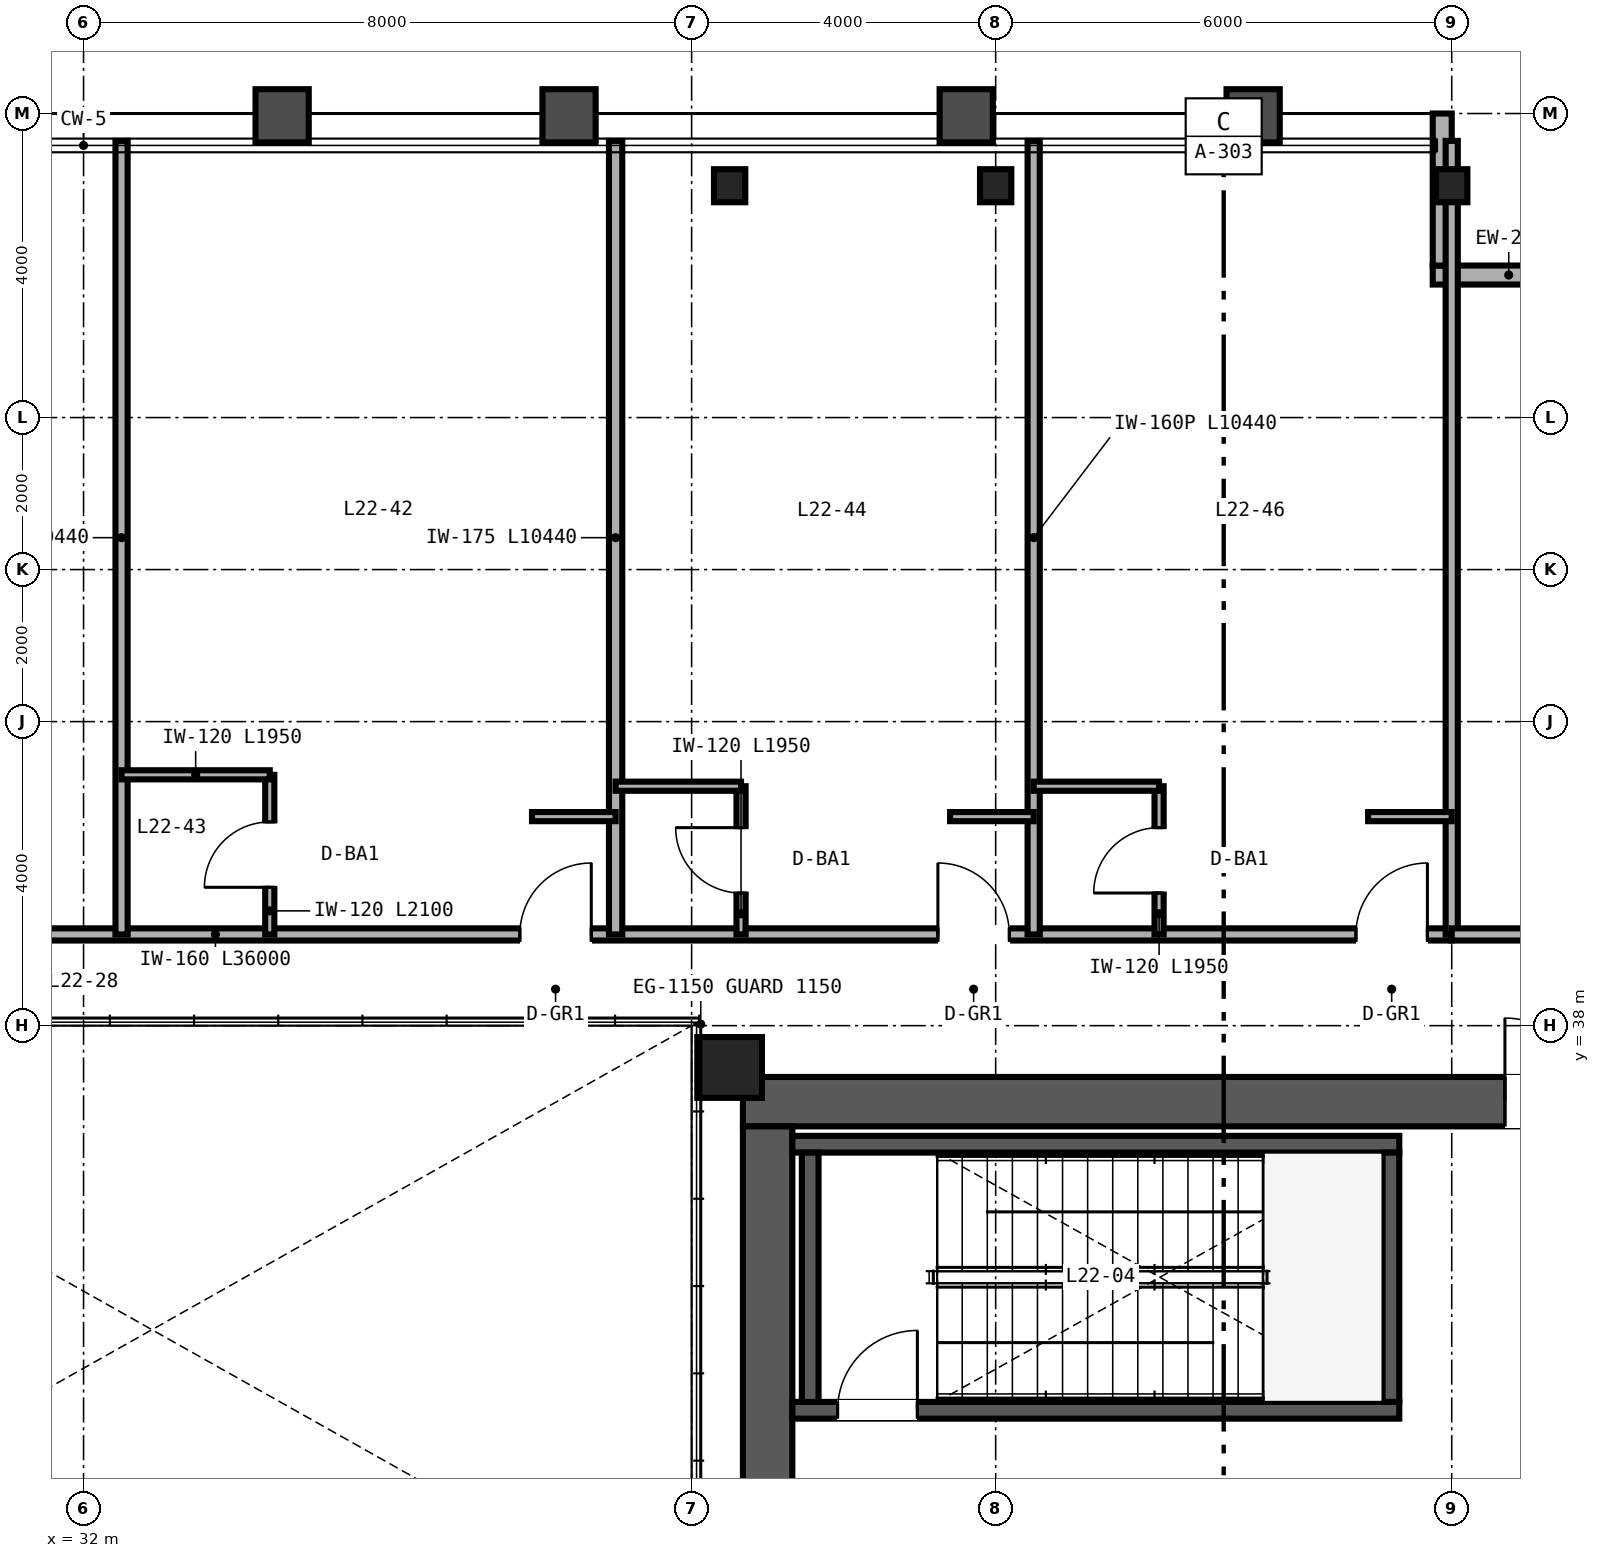
"""IFC4 building model, lengths in metres.
Left out: names, types, materials, properties, quantities, classifications, styles, units other than length and angle.
Written with IfcOpenShell. Run it as: python <this file> out.ifc"""

import sys

from ifc_helpers import new_model, si_unit, direction, frame, frame_2d, origin, origin_2d, place, context, subcontext, project, spatial, rectangle, hollow_rectangle, i_section, extrude, source, transform, mapped, element, fill, save


model = new_model("IFC4")
c1 = context("Model", 3, precision=1e-05, world=origin(), true_north=direction((0.0, 1.0)))
c2 = subcontext(c1, "Body", "Model", "MODEL_VIEW")
j1 = project(units=[si_unit("LENGTHUNIT", "METRE"), si_unit("PLANEANGLEUNIT", "RADIAN")], contexts=[c1])
p1 = place(None, origin())
s1 = spatial("IfcSite", under=j1, at=p1, CompositionType="ELEMENT")
p2 = place(p1, origin())
s2 = spatial("IfcBuilding", under=s1, at=p2, CompositionType="ELEMENT")
p3 = place(p2, frame((0.0, 0.0, 92.4)))
s3 = spatial("IfcBuildingStorey", under=s2, at=p3, CompositionType="ELEMENT", Elevation=92.4)
p4 = place(p3, frame((40.675, 37.0, 0.0), z_axis=(0.0, 0.0, 1.0), x_axis=(1.0, 0.0, 0.0)))
e1 = element("IfcWall", 1, at=p4, inside=s3, PredefinedType="SHEAR", context=c2, shape_type="SweptSolid", body=[
    extrude(rectangle(XDim=12.65, YDim=0.65, at=frame_2d((6.325, 0.0))), origin(), (0.0, 0.0, 1.0), 4.56),
])
p5 = place(p4, frame((10.025, 0.0, 0.0)))
e2 = element("IfcOpeningElement", 2, at=p5, cuts=e1, PredefinedType="OPENING", context=c2, shape_type="SweptSolid", body=[
    extrude(rectangle(XDim=1.1, YDim=2.15, at=frame_2d((0.55, 1.075))), frame((0.0, 0.335, 0.0), z_axis=(0.0, -1.0, 0.0), x_axis=(1.0, 0.0, 0.0)), (0.0, 0.0, 1.0), 0.67),
])
p6 = place(p3, frame((41.0, 15.325, 0.0), z_axis=(0.0, 0.0, 1.0), x_axis=(0.0, 1.0, 0.0)))
e3 = element("IfcWall", 3, at=p6, inside=s3, PredefinedType="SHEAR", context=c2, shape_type="SweptSolid", body=[
    extrude(rectangle(XDim=21.35, YDim=0.65, at=frame_2d((10.675, 0.0))), origin(), (0.0, 0.0, 1.0), 4.56),
])
p7 = place(p3, frame((41.325, 32.94, 0.0), z_axis=(0.0, 0.0, 1.0), x_axis=(1.0, 0.0, 0.0)))
e4 = element("IfcWall", 4, at=p7, inside=s3, PredefinedType="SHEAR", context=c2, shape_type="SweptSolid", body=[
    extrude(rectangle(XDim=7.985, YDim=0.22, at=frame_2d((3.993, 0.0))), origin(), (0.0, 0.0, 1.0), 4.6),
])
p8 = place(p7, frame((0.595, 0.0, 0.0)))
e5 = element("IfcOpeningElement", 5, at=p8, cuts=e4, PredefinedType="OPENING", context=c2, shape_type="SweptSolid", body=[
    extrude(rectangle(XDim=1.05, YDim=2.15, at=frame_2d((0.525, 1.075))), frame((0.0, 0.12, 0.0), z_axis=(0.0, -1.0, 0.0), x_axis=(1.0, 0.0, 0.0)), (0.0, 0.0, 1.0), 0.24),
])
p9 = place(p3, frame((41.325, 36.44, 0.0), z_axis=(0.0, 0.0, 1.0), x_axis=(1.0, 0.0, 0.0)))
e6 = element("IfcWall", 6, at=p9, inside=s3, PredefinedType="SHEAR", context=c2, shape_type="SweptSolid", body=[
    extrude(rectangle(XDim=7.985, YDim=0.22, at=frame_2d((3.993, 0.0))), origin(), (0.0, 0.0, 1.0), 4.6),
])
for number, where, z_axis, x_axis in (
    (7, (41.56, 33.05, 0.0), (0.0, 0.0, 1.0), (0.0, 1.0, 0.0)),
    (8, (49.2, 33.05, 0.0), (0.0, 0.0, 1.0), (0.0, 1.0, 0.0)),
):
    element("IfcWall", number, at=place(p3, frame(where, z_axis=z_axis, x_axis=x_axis)), inside=s3, PredefinedType="SHEAR", context=c2, shape_type="SweptSolid", body=[
        extrude(rectangle(XDim=3.28, YDim=0.22, at=frame_2d((1.64, 0.0))), origin(), (0.0, 0.0, 1.0), 4.6),
    ])
m1 = source(origin(), c2, "Body", "SweptSolid", [
    extrude(hollow_rectangle(XDim=0.85, YDim=0.8, WallThickness=0.032, at=origin_2d()), origin(), (0.0, 0.0, 1.0), 4.56),
])
p10 = place(p3, frame((40.5, 37.45, 0.0), z_axis=(0.0, 0.0, 1.0), x_axis=(1.0, 0.0, 0.0)))
e9 = element("IfcColumn", 9, at=p10, inside=s3, PredefinedType="COLUMN", context=c2, shape_type="MappedRepresentation", body=[
    mapped(m1, transform((0.0, 0.0, 0.0), scale=1.0)),
])
m2 = source(origin(), c2, "Body", "SweptSolid", [
    extrude(i_section(OverallWidth=0.412, OverallDepth=0.435, WebThickness=0.036, FlangeThickness=0.057, FilletRadius=0.025, at=origin_2d()), origin(), (0.0, 0.0, 1.0), 4.56),
])
for number, where, z_axis, x_axis in (
    (10, (40.5, 49.05, 0.0), (0.0, 0.0, 1.0), (1.0, 0.0, 0.0)),
    (11, (44.0, 49.05, 0.0), (0.0, 0.0, 1.0), (1.0, 0.0, 0.0)),
    (12, (50.0, 49.05, 0.0), (0.0, 0.0, 1.0), (1.0, 0.0, 0.0)),
):
    element("IfcColumn", number, at=place(p3, frame(where, z_axis=z_axis, x_axis=x_axis)), inside=s3, PredefinedType="COLUMN", context=c2, shape_type="MappedRepresentation", body=[
        mapped(m2, transform((0.0, 0.0, 0.0), scale=1.0)),
    ])
p11 = place(p3, frame((51.75, 47.875, 0.0), z_axis=(0.0, 0.0, 1.0), x_axis=(-1.0, 0.0, 0.0)))
e13 = element("IfcWall", 13, at=p11, inside=s3, PredefinedType="SOLIDWALL", context=c2, shape_type="SweptSolid", body=[
    extrude(rectangle(XDim=2.0, YDim=0.25, at=frame_2d((1.0, 0.0))), origin(), (0.0, 0.0, 1.0), 4.56),
])
p12 = place(p3, frame((49.875, 48.0, 0.0), z_axis=(0.0, 0.0, 1.0), x_axis=(0.0, 1.0, 0.0)))
e14 = element("IfcWall", 14, at=p12, inside=s3, PredefinedType="SOLIDWALL", context=c2, shape_type="SweptSolid", body=[
    extrude(rectangle(XDim=2.0, YDim=0.25, at=frame_2d((1.0, 0.0))), origin(), (0.0, 0.0, 1.0), 3.867),
])
p13 = place(p3, frame((14.0, 39.2, 0.0), z_axis=(0.0, 0.0, 1.0), x_axis=(1.0, 0.0, 0.0)))
e15 = element("IfcWall", 15, at=p13, inside=s3, PredefinedType="PARTITIONING", context=c2, shape_type="SweptSolid", body=[
    extrude(rectangle(XDim=36.0, YDim=0.16, at=frame_2d((18.0, 0.0))), origin(), (0.0, 0.0, 1.0), 3.781),
])
p14 = place(p13, frame((4.74, 0.0, 0.0)))
e16 = element("IfcOpeningElement", 16, at=p14, cuts=e15, PredefinedType="OPENING", context=c2, shape_type="SweptSolid", body=[
    extrude(rectangle(XDim=0.94, YDim=2.15, at=frame_2d((0.47, 1.075))), frame((0.0, 0.09, 0.0), z_axis=(0.0, -1.0, 0.0), x_axis=(1.0, 0.0, 0.0)), (0.0, 0.0, 1.0), 0.18),
])
p15 = place(p13, frame((10.74, 0.0, 0.0)))
e17 = element("IfcOpeningElement", 17, at=p15, cuts=e15, PredefinedType="OPENING", context=c2, shape_type="SweptSolid", body=[
    extrude(rectangle(XDim=0.94, YDim=2.15, at=frame_2d((0.47, 1.075))), frame((0.0, 0.09, 0.0), z_axis=(0.0, -1.0, 0.0), x_axis=(1.0, 0.0, 0.0)), (0.0, 0.0, 1.0), 0.18),
])
p16 = place(p13, frame((14.77, 0.0, 0.0)))
e18 = element("IfcOpeningElement", 18, at=p16, cuts=e15, PredefinedType="OPENING", context=c2, shape_type="SweptSolid", body=[
    extrude(rectangle(XDim=0.96, YDim=2.15, at=frame_2d((0.48, 1.075))), frame((0.0, 0.09, 0.0), z_axis=(0.0, -1.0, 0.0), x_axis=(1.0, 0.0, 0.0)), (0.0, 0.0, 1.0), 0.18),
])
p17 = place(p13, frame((23.74, 0.0, 0.0)))
e19 = element("IfcOpeningElement", 19, at=p17, cuts=e15, PredefinedType="OPENING", context=c2, shape_type="SweptSolid", body=[
    extrude(rectangle(XDim=0.94, YDim=2.15, at=frame_2d((0.47, 1.075))), frame((0.0, 0.09, 0.0), z_axis=(0.0, -1.0, 0.0), x_axis=(1.0, 0.0, 0.0)), (0.0, 0.0, 1.0), 0.18),
])
p18 = place(p13, frame((29.24, 0.0, 0.0)))
e20 = element("IfcOpeningElement", 20, at=p18, cuts=e15, PredefinedType="OPENING", context=c2, shape_type="SweptSolid", body=[
    extrude(rectangle(XDim=0.94, YDim=2.15, at=frame_2d((0.47, 1.075))), frame((0.0, 0.09, 0.0), z_axis=(0.0, -1.0, 0.0), x_axis=(1.0, 0.0, 0.0)), (0.0, 0.0, 1.0), 0.18),
])
p19 = place(p13, frame((34.74, 0.0, 0.0)))
e21 = element("IfcOpeningElement", 21, at=p19, cuts=e15, PredefinedType="OPENING", context=c2, shape_type="SweptSolid", body=[
    extrude(rectangle(XDim=0.94, YDim=2.15, at=frame_2d((0.47, 1.075))), frame((0.0, 0.09, 0.0), z_axis=(0.0, -1.0, 0.0), x_axis=(1.0, 0.0, 0.0)), (0.0, 0.0, 1.0), 0.18),
])
p20 = place(p3, frame((50.0, 39.2, 0.0), z_axis=(0.0, 0.0, 1.0), x_axis=(0.0, 1.0, 0.0)))
e22 = element("IfcWall", 22, at=p20, inside=s3, PredefinedType="PARTITIONING", context=c2, shape_type="SweptSolid", body=[
    extrude(rectangle(XDim=10.44, YDim=0.16, at=frame_2d((5.22, 0.0))), origin(), (0.0, 0.0, 1.0), 3.867),
])
p21 = place(p3, frame((32.5, 39.2, 0.0), z_axis=(0.0, 0.0, 1.0), x_axis=(0.0, 1.0, 0.0)))
e23 = element("IfcWall", 23, at=p21, inside=s3, PredefinedType="PARTITIONING", context=c2, shape_type="SweptSolid", body=[
    extrude(rectangle(XDim=10.44, YDim=0.16, at=frame_2d((5.22, 0.0))), origin(), (0.0, 0.0, 1.0), 3.633),
])
p22 = place(p3, frame((39.0, 39.2, 0.0), z_axis=(0.0, 0.0, 1.0), x_axis=(0.0, 1.0, 0.0)))
e24 = element("IfcWall", 24, at=p22, inside=s3, PredefinedType="PARTITIONING", context=c2, shape_type="SweptSolid", body=[
    extrude(rectangle(XDim=10.44, YDim=0.175, at=frame_2d((5.22, 0.0))), origin(), (0.0, 0.0, 1.0), 3.633),
])
p23 = place(p3, frame((34.45, 39.2, 0.0), z_axis=(0.0, 0.0, 1.0), x_axis=(0.0, 1.0, 0.0)))
e25 = element("IfcWall", 25, at=p23, inside=s3, PredefinedType="PARTITIONING", context=c2, shape_type="SweptSolid", body=[
    extrude(rectangle(XDim=2.1, YDim=0.12, at=frame_2d((1.05, 0.0))), origin(), (0.0, 0.0, 1.0), 4.56),
])
p24 = place(p23, frame((0.62, 0.0, 0.0)))
e26 = element("IfcOpeningElement", 26, at=p24, cuts=e25, PredefinedType="OPENING", context=c2, shape_type="SweptSolid", body=[
    extrude(rectangle(XDim=0.86, YDim=2.1, at=frame_2d((0.43, 1.05))), frame((0.0, 0.07, 0.0), z_axis=(0.0, -1.0, 0.0), x_axis=(1.0, 0.0, 0.0)), (0.0, 0.0, 1.0), 0.14),
])
p25 = place(p3, frame((32.5, 41.3, 0.0), z_axis=(0.0, 0.0, 1.0), x_axis=(1.0, 0.0, 0.0)))
e27 = element("IfcWall", 27, at=p25, inside=s3, PredefinedType="PARTITIONING", context=c2, shape_type="SweptSolid", body=[
    extrude(rectangle(XDim=1.95, YDim=0.12, at=frame_2d((0.975, 0.0))), origin(), (0.0, 0.0, 1.0), 4.56),
])
p26 = place(p3, frame((37.9, 40.75, 0.0), z_axis=(0.0, 0.0, 1.0), x_axis=(1.0, 0.0, 0.0)))
e28 = element("IfcWall", 28, at=p26, inside=s3, PredefinedType="PARTITIONING", context=c2, shape_type="SweptSolid", body=[
    extrude(rectangle(XDim=1.1, YDim=0.12, at=frame_2d((0.55, 0.0))), origin(), (0.0, 0.0, 1.0), 4.56),
])
p27 = place(p3, frame((44.5, 39.2, 0.0), z_axis=(0.0, 0.0, 1.0), x_axis=(0.0, 1.0, 0.0)))
e29 = element("IfcWall", 29, at=p27, inside=s3, PredefinedType="PARTITIONING", context=c2, shape_type="SweptSolid", body=[
    extrude(rectangle(XDim=10.44, YDim=0.16, at=frame_2d((5.22, 0.0))), origin(), (0.0, 0.0, 1.0), 3.867),
])
p28 = place(p3, frame((40.65, 39.2, 0.0), z_axis=(0.0, 0.0, 1.0), x_axis=(0.0, 1.0, 0.0)))
e30 = element("IfcWall", 30, at=p28, inside=s3, PredefinedType="PARTITIONING", context=c2, shape_type="SweptSolid", body=[
    extrude(rectangle(XDim=1.95, YDim=0.12, at=frame_2d((0.975, 0.0))), origin(), (0.0, 0.0, 1.0), 3.781),
])
p29 = place(p28, frame((0.545, 0.0, 0.0)))
e31 = element("IfcOpeningElement", 31, at=p29, cuts=e30, PredefinedType="OPENING", context=c2, shape_type="SweptSolid", body=[
    extrude(rectangle(XDim=0.86, YDim=2.1, at=frame_2d((0.43, 1.05))), frame((0.0, 0.07, 0.0), z_axis=(0.0, -1.0, 0.0), x_axis=(1.0, 0.0, 0.0)), (0.0, 0.0, 1.0), 0.14),
])
p30 = place(p3, frame((39.0, 41.15, 0.0), z_axis=(0.0, 0.0, 1.0), x_axis=(1.0, 0.0, 0.0)))
e32 = element("IfcWall", 32, at=p30, inside=s3, PredefinedType="PARTITIONING", context=c2, shape_type="SweptSolid", body=[
    extrude(rectangle(XDim=1.65, YDim=0.12, at=frame_2d((0.825, 0.0))), origin(), (0.0, 0.0, 1.0), 3.781),
])
p31 = place(p3, frame((43.4, 40.75, 0.0), z_axis=(0.0, 0.0, 1.0), x_axis=(1.0, 0.0, 0.0)))
e33 = element("IfcWall", 33, at=p31, inside=s3, PredefinedType="PARTITIONING", context=c2, shape_type="SweptSolid", body=[
    extrude(rectangle(XDim=1.1, YDim=0.12, at=frame_2d((0.55, 0.0))), origin(), (0.0, 0.0, 1.0), 4.56),
])
p32 = place(p3, frame((46.15, 39.2, 0.0), z_axis=(0.0, 0.0, 1.0), x_axis=(0.0, 1.0, 0.0)))
e34 = element("IfcWall", 34, at=p32, inside=s3, PredefinedType="PARTITIONING", context=c2, shape_type="SweptSolid", body=[
    extrude(rectangle(XDim=1.95, YDim=0.12, at=frame_2d((0.975, 0.0))), origin(), (0.0, 0.0, 1.0), 4.56),
])
p33 = place(p32, frame((0.545, 0.0, 0.0)))
e35 = element("IfcOpeningElement", 35, at=p33, cuts=e34, PredefinedType="OPENING", context=c2, shape_type="SweptSolid", body=[
    extrude(rectangle(XDim=0.86, YDim=2.1, at=frame_2d((0.43, 1.05))), frame((0.0, 0.07, 0.0), z_axis=(0.0, -1.0, 0.0), x_axis=(1.0, 0.0, 0.0)), (0.0, 0.0, 1.0), 0.14),
])
p34 = place(p3, frame((44.5, 41.15, 0.0), z_axis=(0.0, 0.0, 1.0), x_axis=(1.0, 0.0, 0.0)))
e36 = element("IfcWall", 36, at=p34, inside=s3, PredefinedType="PARTITIONING", context=c2, shape_type="SweptSolid", body=[
    extrude(rectangle(XDim=1.65, YDim=0.12, at=frame_2d((0.825, 0.0))), origin(), (0.0, 0.0, 1.0), 4.56),
])
p35 = place(p3, frame((48.9, 40.75, 0.0), z_axis=(0.0, 0.0, 1.0), x_axis=(1.0, 0.0, 0.0)))
e37 = element("IfcWall", 37, at=p35, inside=s3, PredefinedType="PARTITIONING", context=c2, shape_type="SweptSolid", body=[
    extrude(rectangle(XDim=1.1, YDim=0.12, at=frame_2d((0.55, 0.0))), origin(), (0.0, 0.0, 1.0), 4.56),
])
p36 = place(p3, frame((50.0, 39.2, 0.0), z_axis=(0.0, 0.0, 1.0), x_axis=(1.0, 0.0, 0.0)))
e38 = element("IfcWall", 38, at=p36, inside=s3, PredefinedType="PARTITIONING", context=c2, shape_type="SweptSolid", body=[
    extrude(rectangle(XDim=5.62, YDim=0.16, at=frame_2d((2.81, 0.0))), origin(), (0.0, 0.0, 1.0), 4.56),
])
p37 = place(p36, frame((1.8, 0.0, 0.0)))
e39 = element("IfcOpeningElement", 39, at=p37, cuts=e38, PredefinedType="OPENING", context=c2, shape_type="SweptSolid", body=[
    extrude(rectangle(XDim=0.96, YDim=2.15, at=frame_2d((0.48, 1.075))), frame((0.0, 0.09, 0.0), z_axis=(0.0, -1.0, 0.0), x_axis=(1.0, 0.0, 0.0)), (0.0, 0.0, 1.0), 0.18),
])
m3 = source(origin(), c2, "Body", "SweptSolid", [
    extrude(rectangle(XDim=1.05, YDim=2.15, at=frame_2d((0.525, 1.075))), frame((0.0, 0.025, 0.0), z_axis=(0.0, -1.0, 0.0), x_axis=(1.0, 0.0, 0.0)), (0.0, 0.0, 1.0), 0.05),
])
p38 = place(p8, origin())
e40 = element("IfcDoor", 40, at=p38, inside=s3, OperationType="SINGLE_SWING_RIGHT", PredefinedType="DOOR", context=c2, shape_type="MappedRepresentation", body=[
    mapped(m3, transform((0.0, 0.0, 0.0), scale=1.0)),
])
fill(e5, e40)
m4 = source(origin(), c2, "Body", "SweptSolid", [
    extrude(rectangle(XDim=1.1, YDim=2.15, at=frame_2d((0.55, 1.075))), frame((0.0, 0.025, 0.0), z_axis=(0.0, -1.0, 0.0), x_axis=(1.0, 0.0, 0.0)), (0.0, 0.0, 1.0), 0.05),
])
p39 = place(p5, origin())
e41 = element("IfcDoor", 41, at=p39, inside=s3, OperationType="SINGLE_SWING_LEFT", PredefinedType="DOOR", context=c2, shape_type="MappedRepresentation", body=[
    mapped(m4, transform((0.0, 0.0, 0.0), scale=1.0)),
])
fill(e2, e41)
m5 = source(origin(), c2, "Body", "SweptSolid", [
    extrude(rectangle(XDim=0.86, YDim=2.1, at=frame_2d((0.43, 1.05))), frame((0.0, 0.025, 0.0), z_axis=(0.0, -1.0, 0.0), x_axis=(1.0, 0.0, 0.0)), (0.0, 0.0, 1.0), 0.05),
])
p40 = place(p24, origin())
e42 = element("IfcDoor", 42, at=p40, inside=s3, OperationType="SINGLE_SWING_LEFT", PredefinedType="DOOR", context=c2, shape_type="MappedRepresentation", body=[
    mapped(m5, transform((0.0, 0.0, 0.0), scale=1.0)),
])
fill(e26, e42)
p41 = place(p29, origin())
e43 = element("IfcDoor", 43, at=p41, inside=s3, OperationType="SINGLE_SWING_RIGHT", PredefinedType="DOOR", context=c2, shape_type="MappedRepresentation", body=[
    mapped(m5, transform((0.0, 0.0, 0.0), scale=1.0)),
])
fill(e31, e43)
p42 = place(p33, origin())
e44 = element("IfcDoor", 44, at=p42, inside=s3, OperationType="SINGLE_SWING_LEFT", PredefinedType="DOOR", context=c2, shape_type="MappedRepresentation", body=[
    mapped(m5, transform((0.0, 0.0, 0.0), scale=1.0)),
])
fill(e35, e44)
m6 = source(origin(), c2, "Body", "SweptSolid", [
    extrude(rectangle(XDim=0.94, YDim=2.15, at=frame_2d((0.47, 1.075))), frame((0.0, 0.025, 0.0), z_axis=(0.0, -1.0, 0.0), x_axis=(1.0, 0.0, 0.0)), (0.0, 0.0, 1.0), 0.05),
])
p43 = place(p17, origin())
e45 = element("IfcDoor", 45, at=p43, inside=s3, OperationType="SINGLE_SWING_RIGHT", PredefinedType="DOOR", context=c2, shape_type="MappedRepresentation", body=[
    mapped(m6, transform((0.0, 0.0, 0.0), scale=1.0)),
])
fill(e19, e45)
p44 = place(p18, origin())
e46 = element("IfcDoor", 46, at=p44, inside=s3, OperationType="SINGLE_SWING_LEFT", PredefinedType="DOOR", context=c2, shape_type="MappedRepresentation", body=[
    mapped(m6, transform((0.0, 0.0, 0.0), scale=1.0)),
])
fill(e20, e46)
p45 = place(p19, origin())
e47 = element("IfcDoor", 47, at=p45, inside=s3, OperationType="SINGLE_SWING_RIGHT", PredefinedType="DOOR", context=c2, shape_type="MappedRepresentation", body=[
    mapped(m6, transform((0.0, 0.0, 0.0), scale=1.0)),
])
fill(e21, e47)
save(model, sys.argv[1])
